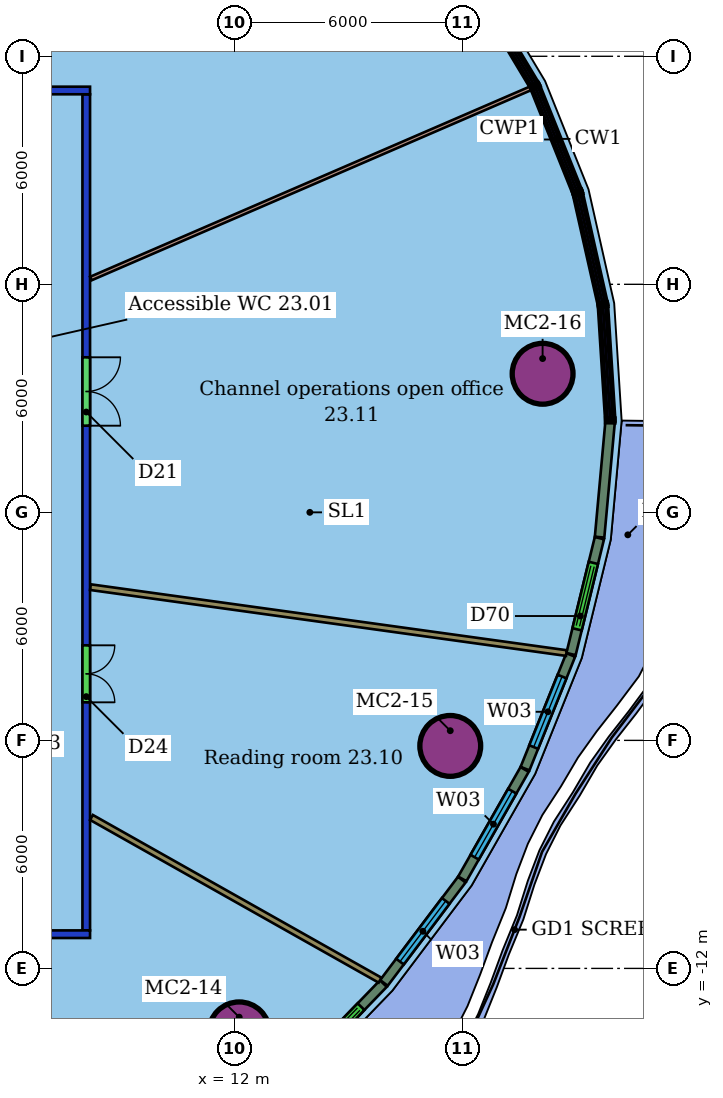
"""IFC4 building model, lengths in metres.
Left out: names, types, materials, properties, quantities, classifications, styles, units other than length and angle.
Written with IfcOpenShell. Run it as: python <this file> out.ifc"""

import sys

from ifc_helpers import new_model, si_unit, direction, frame, frame_2d, origin, origin_2d, place, context, subcontext, project, spatial, rectangle, hollow_circle, extrude, element, fill, save


model = new_model("IFC4")
c1 = context("Model", 3, precision=1e-05, world=origin(), true_north=direction((0.0, 1.0)))
c2 = subcontext(c1, "Body", "Model", "MODEL_VIEW")
j1 = project(units=[si_unit("LENGTHUNIT", "METRE"), si_unit("PLANEANGLEUNIT", "RADIAN")], contexts=[c1])
p1 = place(None, origin())
s1 = spatial("IfcSite", under=j1, at=p1, CompositionType="ELEMENT")
p2 = place(p1, origin())
s2 = spatial("IfcBuilding", under=s1, at=p2, CompositionType="ELEMENT")
p3 = place(p2, frame((0.0, 0.0, 103.0)))
s3 = spatial("IfcBuildingStorey", under=s2, at=p3, CompositionType="ELEMENT", Elevation=103.0)
for number, where, z_axis, x_axis in (
    (1, (12.125, -13.683, 0.0), (0.0, 0.0, 1.0), (1.0, 0.0, 0.0)),
    (2, (17.679, -6.146, 0.0), (0.0, 0.0, 1.0), (1.0, 0.0, 0.0)),
    (3, (20.109, 3.646, 0.0), (0.0, 0.0, 1.0), (1.0, 0.0, 0.0)),
):
    element("IfcColumn", number, at=place(p3, frame(where, z_axis=z_axis, x_axis=x_axis)), inside=s3, PredefinedType="COLUMN", context=c2, shape_type="SweptSolid", body=[
        extrude(hollow_circle(Radius=0.8, WallThickness=0.055, at=origin_2d()), origin(), (0.0, 0.0, 1.0), 3.45),
    ])
p4 = place(p3, frame((8.2, -11.1, 0.0), z_axis=(0.0, 0.0, 1.0), x_axis=(-1.0, 0.0, 0.0)))
e4 = element("IfcWall", 4, at=p4, inside=s3, PredefinedType="PARTITIONING", context=c2, shape_type="SweptSolid", body=[
    extrude(rectangle(XDim=28.4, YDim=0.2, at=frame_2d((14.2, 0.0))), origin(), (0.0, 0.0, 1.0), 3.0),
])
p5 = place(p4, frame((19.071, 0.0, 0.0)))
e5 = element("IfcOpeningElement", 5, at=p5, cuts=e4, PredefinedType="OPENING", context=c2, shape_type="SweptSolid", body=[
    extrude(rectangle(XDim=1.0, YDim=2.1, at=frame_2d((0.5, 1.05))), frame((0.0, 0.11, 0.0), z_axis=(0.0, -1.0, 0.0), x_axis=(1.0, 0.0, 0.0)), (0.0, 0.0, 1.0), 0.22),
])
p6 = place(p4, frame((9.847, 0.0, 0.0)))
e6 = element("IfcOpeningElement", 6, at=p6, cuts=e4, PredefinedType="OPENING", context=c2, shape_type="SweptSolid", body=[
    extrude(rectangle(XDim=1.8, YDim=2.1, at=frame_2d((0.9, 1.05))), frame((0.0, 0.11, 0.0), z_axis=(0.0, -1.0, 0.0), x_axis=(1.0, 0.0, 0.0)), (0.0, 0.0, 1.0), 0.22),
])
p7 = place(p3, frame((-20.2, 11.1, 0.0), z_axis=(0.0, 0.0, 1.0), x_axis=(1.0, 0.0, 0.0)))
e7 = element("IfcWall", 7, at=p7, inside=s3, PredefinedType="PARTITIONING", context=c2, shape_type="SweptSolid", body=[
    extrude(rectangle(XDim=28.4, YDim=0.2, at=frame_2d((14.2, 0.0))), origin(), (0.0, 0.0, 1.0), 3.0),
])
p8 = place(p7, frame((21.908, 0.0, 0.0)))
e8 = element("IfcOpeningElement", 8, at=p8, cuts=e7, PredefinedType="OPENING", context=c2, shape_type="SweptSolid", body=[
    extrude(rectangle(XDim=1.8, YDim=2.1, at=frame_2d((0.9, 1.05))), frame((0.0, 0.11, 0.0), z_axis=(0.0, -1.0, 0.0), x_axis=(1.0, 0.0, 0.0)), (0.0, 0.0, 1.0), 0.22),
])
p9 = place(p7, frame((16.118, 0.0, 0.0)))
e9 = element("IfcOpeningElement", 9, at=p9, cuts=e7, PredefinedType="OPENING", context=c2, shape_type="SweptSolid", body=[
    extrude(rectangle(XDim=1.0, YDim=2.1, at=frame_2d((0.5, 1.05))), frame((0.0, 0.11, 0.0), z_axis=(0.0, -1.0, 0.0), x_axis=(1.0, 0.0, 0.0)), (0.0, 0.0, 1.0), 0.22),
])
p10 = place(p7, frame((8.5, 0.0, 0.0)))
e10 = element("IfcOpeningElement", 10, at=p10, cuts=e7, PredefinedType="OPENING", context=c2, shape_type="SweptSolid", body=[
    extrude(rectangle(XDim=1.0, YDim=2.4, at=frame_2d((0.5, 1.2))), frame((0.0, 0.11, 0.0), z_axis=(0.0, -1.0, 0.0), x_axis=(1.0, 0.0, 0.0)), (0.0, 0.0, 1.0), 0.22),
])
p11 = place(p7, frame((3.55, 0.0, 0.0)))
e11 = element("IfcOpeningElement", 11, at=p11, cuts=e7, PredefinedType="OPENING", context=c2, shape_type="SweptSolid", body=[
    extrude(rectangle(XDim=0.9, YDim=2.1, at=frame_2d((0.45, 1.05))), frame((0.0, 0.11, 0.0), z_axis=(0.0, -1.0, 0.0), x_axis=(1.0, 0.0, 0.0)), (0.0, 0.0, 1.0), 0.22),
])
p12 = place(p3, frame((8.1, 11.0, 0.0), z_axis=(0.0, 0.0, 1.0), x_axis=(0.0, -1.0, 0.0)))
e12 = element("IfcWall", 12, at=p12, inside=s3, PredefinedType="PARTITIONING", context=c2, shape_type="SweptSolid", body=[
    extrude(rectangle(XDim=22.0, YDim=0.2, at=frame_2d((11.0, 0.0))), origin(), (0.0, 0.0, 1.0), 3.0),
])
p13 = place(p12, frame((14.499, 0.0, 0.0)))
e13 = element("IfcOpeningElement", 13, at=p13, cuts=e12, PredefinedType="OPENING", context=c2, shape_type="SweptSolid", body=[
    extrude(rectangle(XDim=1.5, YDim=2.1, at=frame_2d((0.75, 1.05))), frame((0.0, 0.11, 0.0), z_axis=(0.0, -1.0, 0.0), x_axis=(1.0, 0.0, 0.0)), (0.0, 0.0, 1.0), 0.22),
])
p14 = place(p12, frame((6.92, 0.0, 0.0)))
e14 = element("IfcOpeningElement", 14, at=p14, cuts=e12, PredefinedType="OPENING", context=c2, shape_type="SweptSolid", body=[
    extrude(rectangle(XDim=1.8, YDim=2.1, at=frame_2d((0.9, 1.05))), frame((0.0, 0.11, 0.0), z_axis=(0.0, -1.0, 0.0), x_axis=(1.0, 0.0, 0.0)), (0.0, 0.0, 1.0), 0.22),
])
p15 = place(p3, frame((19.794, 11.158, 0.0), z_axis=(0.0, 0.0, 1.0), x_axis=(-0.917806893713, -0.397027084533, 0.0)))
e15 = element("IfcWall", 15, at=p15, inside=s3, PredefinedType="PARTITIONING", context=c2, shape_type="SweptSolid", body=[
    extrude(rectangle(XDim=12.61, YDim=0.1, at=frame_2d((6.305, 0.0))), origin(), (0.0, 0.0, 1.0), 3.45),
])
p16 = place(p3, frame((15.831, -12.31, 0.0), z_axis=(0.0, 0.0, 1.0), x_axis=(-0.871068786754, 0.491161041556, 0.0)))
e16 = element("IfcWall", 16, at=p16, inside=s3, PredefinedType="PARTITIONING", context=c2, shape_type="SweptSolid", body=[
    extrude(rectangle(XDim=8.719, YDim=0.15, at=frame_2d((4.359, 0.0))), origin(), (0.0, 0.0, 1.0), 3.45),
])
p17 = place(p3, frame((20.735, -3.703, 0.0), z_axis=(0.0, 0.0, 1.0), x_axis=(-0.990544821397, 0.13718949232, 0.0)))
e17 = element("IfcWall", 17, at=p17, inside=s3, PredefinedType="PARTITIONING", context=c2, shape_type="SweptSolid", body=[
    extrude(rectangle(XDim=12.644, YDim=0.15, at=frame_2d((6.322, 0.0))), origin(), (0.0, 0.0, 1.0), 3.45),
])
p18 = place(p3, frame((13.494, -14.908, 0.0), z_axis=(0.0, 0.0, 1.0), x_axis=(0.694896677822, 0.719109593283, 0.0)))
e18 = element("IfcWall", 18, at=p18, inside=s3, PredefinedType="SOLIDWALL", context=c2, shape_type="SweptSolid", body=[
    extrude(rectangle(XDim=3.489, YDim=0.25, at=frame_2d((1.744, 0.0))), origin(), (0.0, 0.0, 1.0), 3.05),
])
p19 = place(p18, frame((0.844, 0.0, 0.0)))
e19 = element("IfcOpeningElement", 19, at=p19, cuts=e18, PredefinedType="OPENING", context=c2, shape_type="SweptSolid", body=[
    extrude(rectangle(XDim=1.8, YDim=2.4, at=frame_2d((0.9, 1.2))), frame((0.0, 0.135, 0.0), z_axis=(0.0, -1.0, 0.0), x_axis=(1.0, 0.0, 0.0)), (0.0, 0.0, 1.0), 0.27),
])
p20 = place(p3, frame((15.933, -12.382, 0.0), z_axis=(0.0, 0.0, 1.0), x_axis=(0.602098174714, 0.798422061322, 0.0)))
e20 = element("IfcWall", 20, at=p20, inside=s3, PredefinedType="SOLIDWALL", context=c2, shape_type="SweptSolid", body=[
    extrude(rectangle(XDim=3.404, YDim=0.25, at=frame_2d((1.702, 0.0))), origin(), (0.0, 0.0, 1.0), 3.05),
])
p21 = place(p20, frame((0.702, 0.0, 0.9)))
e21 = element("IfcOpeningElement", 21, at=p21, cuts=e20, PredefinedType="OPENING", context=c2, shape_type="SweptSolid", body=[
    extrude(rectangle(XDim=2.0, YDim=2.1, at=frame_2d((1.0, 1.05))), frame((0.0, 0.135, 0.0), z_axis=(0.0, -1.0, 0.0), x_axis=(1.0, 0.0, 0.0)), (0.0, 0.0, 1.0), 0.27),
])
p22 = place(p3, frame((17.996, -9.644, 0.0), z_axis=(0.0, 0.0, 1.0), x_axis=(0.494876492028, 0.868963323529, 0.0)))
e22 = element("IfcWall", 22, at=p22, inside=s3, PredefinedType="SOLIDWALL", context=c2, shape_type="SweptSolid", body=[
    extrude(rectangle(XDim=3.313, YDim=0.25, at=frame_2d((1.656, 0.0))), origin(), (0.0, 0.0, 1.0), 3.05),
])
p23 = place(p22, frame((0.656, 0.0, 0.9)))
e23 = element("IfcOpeningElement", 23, at=p23, cuts=e22, PredefinedType="OPENING", context=c2, shape_type="SweptSolid", body=[
    extrude(rectangle(XDim=2.0, YDim=2.1, at=frame_2d((1.0, 1.05))), frame((0.0, 0.135, 0.0), z_axis=(0.0, -1.0, 0.0), x_axis=(1.0, 0.0, 0.0)), (0.0, 0.0, 1.0), 0.27),
])
p24 = place(p3, frame((19.646, -6.743, 0.0), z_axis=(0.0, 0.0, 1.0), x_axis=(0.373166307387, 0.927764467433, 0.0)))
e24 = element("IfcWall", 24, at=p24, inside=s3, PredefinedType="SOLIDWALL", context=c2, shape_type="SweptSolid", body=[
    extrude(rectangle(XDim=3.223, YDim=0.25, at=frame_2d((1.611, 0.0))), origin(), (0.0, 0.0, 1.0), 3.05),
])
p25 = place(p24, frame((0.611, 0.0, 0.9)))
e25 = element("IfcOpeningElement", 25, at=p25, cuts=e24, PredefinedType="OPENING", context=c2, shape_type="SweptSolid", body=[
    extrude(rectangle(XDim=2.0, YDim=2.1, at=frame_2d((1.0, 1.05))), frame((0.0, 0.135, 0.0), z_axis=(0.0, -1.0, 0.0), x_axis=(1.0, 0.0, 0.0)), (0.0, 0.0, 1.0), 0.27),
])
p26 = place(p3, frame((20.857, -3.728, 0.0), z_axis=(0.0, 0.0, 1.0), x_axis=(0.237849267936, 0.971302077493, 0.0)))
e26 = element("IfcWall", 26, at=p26, inside=s3, PredefinedType="SOLIDWALL", context=c2, shape_type="SweptSolid", body=[
    extrude(rectangle(XDim=3.14, YDim=0.25, at=frame_2d((1.57, 0.0))), origin(), (0.0, 0.0, 1.0), 3.05),
])
p27 = place(p26, frame((0.67, 0.0, 0.0)))
e27 = element("IfcOpeningElement", 27, at=p27, cuts=e26, PredefinedType="OPENING", context=c2, shape_type="SweptSolid", body=[
    extrude(rectangle(XDim=1.8, YDim=2.4, at=frame_2d((0.9, 1.2))), frame((0.0, 0.135, 0.0), z_axis=(0.0, -1.0, 0.0), x_axis=(1.0, 0.0, 0.0)), (0.0, 0.0, 1.0), 0.27),
])
p28 = place(p3, frame((21.608, -0.652, 0.0), z_axis=(0.0, 0.0, 1.0), x_axis=(0.09099355154, 0.995851481687, 0.0)))
e28 = element("IfcWall", 28, at=p28, inside=s3, PredefinedType="SOLIDWALL", context=c2, shape_type="SweptSolid", body=[
    extrude(rectangle(XDim=3.029, YDim=0.25, at=frame_2d((1.515, 0.0))), origin(), (0.0, 0.0, 1.0), 3.05),
])
p29 = place(p13, origin())
e29 = element("IfcDoor", 29, at=p29, inside=s3, OperationType="DOUBLE_DOOR_SINGLE_SWING", PredefinedType="DOOR", context=c2, shape_type="SweptSolid", body=[
    extrude(rectangle(XDim=1.5, YDim=2.1, at=frame_2d((0.75, 1.05))), frame((0.0, 0.025, 0.0), z_axis=(0.0, -1.0, 0.0), x_axis=(1.0, 0.0, 0.0)), (0.0, 0.0, 1.0), 0.05),
])
fill(e13, e29)
p30 = place(p14, origin())
e30 = element("IfcDoor", 30, at=p30, inside=s3, OperationType="DOUBLE_DOOR_SINGLE_SWING", PredefinedType="DOOR", context=c2, shape_type="SweptSolid", body=[
    extrude(rectangle(XDim=1.8, YDim=2.1, at=frame_2d((0.9, 1.05))), frame((0.0, 0.025, 0.0), z_axis=(0.0, -1.0, 0.0), x_axis=(1.0, 0.0, 0.0)), (0.0, 0.0, 1.0), 0.05),
])
fill(e14, e30)
p31 = place(p19, origin())
e31 = element("IfcDoor", 31, at=p31, inside=s3, OperationType="DOUBLE_DOOR_SLIDING", PredefinedType="DOOR", context=c2, shape_type="SweptSolid", body=[
    extrude(rectangle(XDim=1.8, YDim=2.4, at=frame_2d((0.9, 1.2))), frame((0.0, 0.025, 0.0), z_axis=(0.0, -1.0, 0.0), x_axis=(1.0, 0.0, 0.0)), (0.0, 0.0, 1.0), 0.05),
])
fill(e19, e31)
p32 = place(p21, origin())
e32 = element("IfcWindow", 32, at=p32, inside=s3, PartitioningType="SINGLE_PANEL", PredefinedType="WINDOW", context=c2, shape_type="SweptSolid", body=[
    extrude(rectangle(XDim=2.0, YDim=2.1, at=frame_2d((1.0, 1.05))), frame((0.0, 0.03, 0.0), z_axis=(0.0, -1.0, 0.0), x_axis=(1.0, 0.0, 0.0)), (0.0, 0.0, 1.0), 0.06),
])
fill(e21, e32)
p33 = place(p23, origin())
e33 = element("IfcWindow", 33, at=p33, inside=s3, PartitioningType="SINGLE_PANEL", PredefinedType="WINDOW", context=c2, shape_type="SweptSolid", body=[
    extrude(rectangle(XDim=2.0, YDim=2.1, at=frame_2d((1.0, 1.05))), frame((0.0, 0.03, 0.0), z_axis=(0.0, -1.0, 0.0), x_axis=(1.0, 0.0, 0.0)), (0.0, 0.0, 1.0), 0.06),
])
fill(e23, e33)
p34 = place(p25, origin())
e34 = element("IfcWindow", 34, at=p34, inside=s3, PartitioningType="SINGLE_PANEL", PredefinedType="WINDOW", context=c2, shape_type="SweptSolid", body=[
    extrude(rectangle(XDim=2.0, YDim=2.1, at=frame_2d((1.0, 1.05))), frame((0.0, 0.03, 0.0), z_axis=(0.0, -1.0, 0.0), x_axis=(1.0, 0.0, 0.0)), (0.0, 0.0, 1.0), 0.06),
])
fill(e25, e34)
p35 = place(p27, origin())
e35 = element("IfcDoor", 35, at=p35, inside=s3, OperationType="DOUBLE_DOOR_SLIDING", PredefinedType="DOOR", context=c2, shape_type="SweptSolid", body=[
    extrude(rectangle(XDim=1.8, YDim=2.4, at=frame_2d((0.9, 1.2))), frame((0.0, 0.025, 0.0), z_axis=(0.0, -1.0, 0.0), x_axis=(1.0, 0.0, 0.0)), (0.0, 0.0, 1.0), 0.05),
])
fill(e27, e35)
save(model, sys.argv[1])
